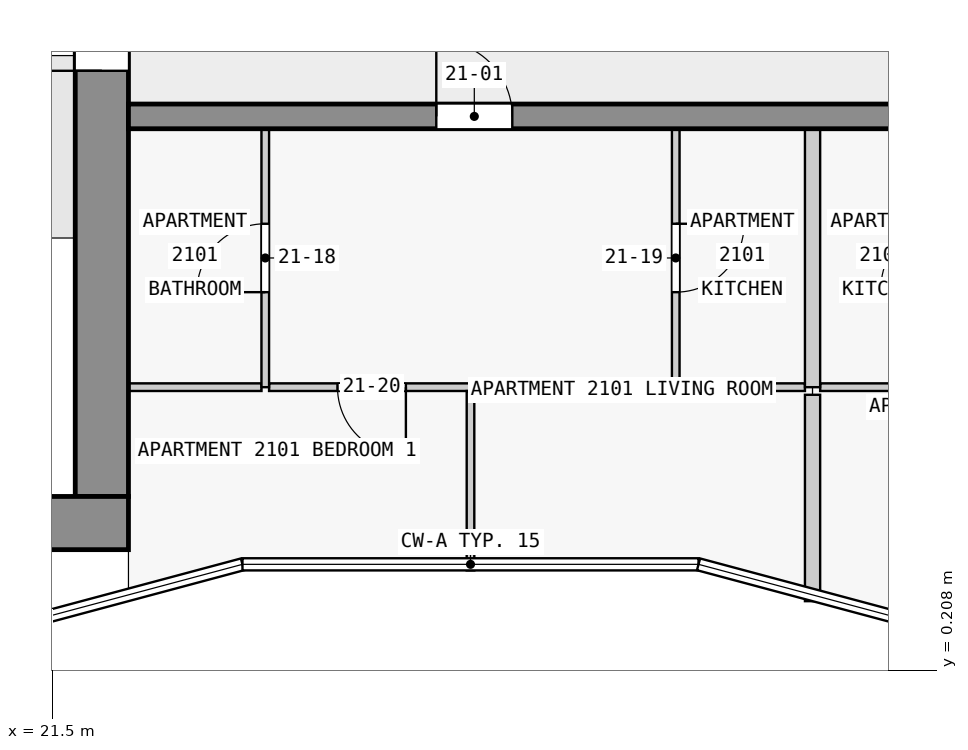
"""IFC4 building model, lengths in metres.
Left out: names, types, materials, properties, quantities, classifications, styles, units other than length and angle.
Written with IfcOpenShell. Run it as: python <this file> out.ifc"""

import sys

from ifc_helpers import new_model, si_unit, direction, frame, frame_2d, origin, place, context, subcontext, project, spatial, rectangle, extrude, element, fill, save


model = new_model("IFC4")
c1 = context("Model", 3, precision=1e-05, world=origin(), true_north=direction((0.0, 1.0)))
c2 = subcontext(c1, "Body", "Model", "MODEL_VIEW")
j1 = project(units=[si_unit("LENGTHUNIT", "METRE"), si_unit("PLANEANGLEUNIT", "RADIAN")], contexts=[c1])
p1 = place(None, origin())
s1 = spatial("IfcSite", under=j1, at=p1, CompositionType="ELEMENT")
p2 = place(p1, origin())
s2 = spatial("IfcBuilding", under=s1, at=p2, CompositionType="ELEMENT")
p3 = place(p2, frame((0.0, 0.0, 85.3)))
s3 = spatial("IfcBuildingStorey", under=s2, at=p3, CompositionType="ELEMENT", Elevation=85.3)
p4 = place(p3, frame((1.6, 2.15, 0.0), z_axis=(0.0, 0.0, 1.0), x_axis=(1.0, 0.0, 0.0)))
e1 = element("IfcWall", 1, at=p4, inside=s3, PredefinedType="SHEAR", context=c2, shape_type="SweptSolid", body=[
    extrude(rectangle(XDim=20.9, YDim=0.7, at=frame_2d((10.45, 0.0))), origin(), (0.0, 0.0, 1.0), 3.25),
])
p5 = place(p3, frame((22.15, 2.5, 0.0), z_axis=(0.0, 0.0, 1.0), x_axis=(0.0, 1.0, 0.0)))
e2 = element("IfcWall", 2, at=p5, inside=s3, PredefinedType="SHEAR", context=c2, shape_type="SweptSolid", body=[
    extrude(rectangle(XDim=14.8, YDim=0.7, at=frame_2d((7.4, 0.0))), origin(), (0.0, 0.0, 1.0), 3.25),
])
p6 = place(p5, frame((5.6, 0.0, 0.0)))
e3 = element("IfcOpeningElement", 3, at=p6, cuts=e2, PredefinedType="OPENING", context=c2, shape_type="SweptSolid", body=[
    extrude(rectangle(XDim=1.8, YDim=2.1, at=frame_2d((0.9, 1.05))), frame((0.0, 0.36, 0.0), z_axis=(0.0, -1.0, 0.0), x_axis=(1.0, 0.0, 0.0)), (0.0, 0.0, 1.0), 0.72),
])
p7 = place(p3, frame((22.5, 7.5, 0.0), z_axis=(0.0, 0.0, 1.0), x_axis=(1.0, 0.0, 0.0)))
e4 = element("IfcWall", 4, at=p7, inside=s3, PredefinedType="SHEAR", context=c2, shape_type="SweptSolid", body=[
    extrude(rectangle(XDim=22.5, YDim=0.325, at=frame_2d((11.25, 0.0))), origin(), (0.0, 0.0, 1.0), 3.25),
])
p8 = place(p7, frame((4.05, 0.0, 0.0)))
e5 = element("IfcOpeningElement", 5, at=p8, cuts=e4, PredefinedType="OPENING", context=c2, shape_type="SweptSolid", body=[
    extrude(rectangle(XDim=1.0, YDim=2.1, at=frame_2d((0.5, 1.05))), frame((0.0, 0.172, 0.0), z_axis=(0.0, -1.0, 0.0), x_axis=(1.0, 0.0, 0.0)), (0.0, 0.0, 1.0), 0.345),
])
p9 = place(p7, frame((13.05, 0.0, 0.0)))
e6 = element("IfcOpeningElement", 6, at=p9, cuts=e4, PredefinedType="OPENING", context=c2, shape_type="SweptSolid", body=[
    extrude(rectangle(XDim=1.0, YDim=2.1, at=frame_2d((0.5, 1.05))), frame((0.0, 0.172, 0.0), z_axis=(0.0, -1.0, 0.0), x_axis=(1.0, 0.0, 0.0)), (0.0, 0.0, 1.0), 0.345),
])
p10 = place(p7, frame((18.75, 0.0, 0.0)))
e7 = element("IfcOpeningElement", 7, at=p10, cuts=e4, PredefinedType="OPENING", context=c2, shape_type="SweptSolid", body=[
    extrude(rectangle(XDim=0.9, YDim=2.1, at=frame_2d((0.45, 1.05))), frame((0.0, 0.172, 0.0), z_axis=(0.0, -1.0, 0.0), x_axis=(1.0, 0.0, 0.0)), (0.0, 0.0, 1.0), 0.345),
])
p11 = place(p7, frame((20.95, 0.0, 0.0)))
e8 = element("IfcOpeningElement", 8, at=p11, cuts=e4, PredefinedType="OPENING", context=c2, shape_type="SweptSolid", body=[
    extrude(rectangle(XDim=1.0, YDim=2.1, at=frame_2d((0.5, 1.05))), frame((0.0, 0.172, 0.0), z_axis=(0.0, -1.0, 0.0), x_axis=(1.0, 0.0, 0.0)), (0.0, 0.0, 1.0), 0.345),
])
p12 = place(p3, frame((27.0, 3.938, 0.0), z_axis=(0.0, 0.0, 1.0), x_axis=(-1.0, 0.0, 0.0)))
e9 = element("IfcWall", 9, at=p12, inside=s3, PredefinedType="PARTITIONING", context=c2, shape_type="SweptSolid", body=[
    extrude(rectangle(XDim=2.65, YDim=0.1, at=frame_2d((1.325, 0.0))), origin(), (0.0, 0.0, 1.0), 3.25),
])
p13 = place(p12, frame((0.85, 0.0, 0.0)))
e10 = element("IfcOpeningElement", 10, at=p13, cuts=e9, PredefinedType="OPENING", context=c2, shape_type="SweptSolid", body=[
    extrude(rectangle(XDim=0.9, YDim=2.1, at=frame_2d((0.45, 1.05))), frame((0.0, 0.06, 0.0), z_axis=(0.0, -1.0, 0.0), x_axis=(1.0, 0.0, 0.0)), (0.0, 0.0, 1.0), 0.12),
])
p14 = place(p3, frame((22.5, 3.938, 0.0), z_axis=(0.0, 0.0, 1.0), x_axis=(1.0, 0.0, 0.0)))
e11 = element("IfcWall", 11, at=p14, inside=s3, PredefinedType="PARTITIONING", context=c2, shape_type="SweptSolid", body=[
    extrude(rectangle(XDim=1.75, YDim=0.1, at=frame_2d((0.875, 0.0))), origin(), (0.0, 0.0, 1.0), 3.25),
])
for number, where, z_axis, x_axis in (
    (12, (29.7, 3.938, 0.0), (0.0, 0.0, 1.0), (1.0, 0.0, 0.0)),
    (13, (31.6, 3.938, 0.0), (0.0, 0.0, 1.0), (1.0, 0.0, 0.0)),
):
    element("IfcWall", number, at=place(p3, frame(where, z_axis=z_axis, x_axis=x_axis)), inside=s3, PredefinedType="PARTITIONING", context=c2, shape_type="SweptSolid", body=[
        extrude(rectangle(XDim=1.7, YDim=0.1, at=frame_2d((0.85, 0.0))), origin(), (0.0, 0.0, 1.0), 3.25),
    ])
p15 = place(p3, frame((24.3, 3.938, 0.0), z_axis=(0.0, 0.0, 1.0), x_axis=(0.0, 1.0, 0.0)))
e14 = element("IfcWall", 14, at=p15, inside=s3, PredefinedType="PARTITIONING", context=c2, shape_type="SweptSolid", body=[
    extrude(rectangle(XDim=3.4, YDim=0.1, at=frame_2d((1.7, 0.0))), origin(), (0.0, 0.0, 1.0), 3.25),
])
p16 = place(p15, frame((1.25, 0.0, 0.0)))
e15 = element("IfcOpeningElement", 15, at=p16, cuts=e14, PredefinedType="OPENING", context=c2, shape_type="SweptSolid", body=[
    extrude(rectangle(XDim=0.9, YDim=2.1, at=frame_2d((0.45, 1.05))), frame((0.0, 0.06, 0.0), z_axis=(0.0, -1.0, 0.0), x_axis=(1.0, 0.0, 0.0)), (0.0, 0.0, 1.0), 0.12),
])
p17 = place(p3, frame((27.0, 1.527, 0.0), z_axis=(0.0, 0.0, 1.0), x_axis=(0.0, 1.0, 0.0)))
e16 = element("IfcWall", 16, at=p17, inside=s3, PredefinedType="PARTITIONING", context=c2, shape_type="SweptSolid", body=[
    extrude(rectangle(XDim=2.361, YDim=0.1, at=frame_2d((1.18, 0.0))), origin(), (0.0, 0.0, 1.0), 3.25),
])
p18 = place(p3, frame((29.7, 7.337, 0.0), z_axis=(0.0, 0.0, 1.0), x_axis=(0.0, -1.0, 0.0)))
e17 = element("IfcWall", 17, at=p18, inside=s3, PredefinedType="PARTITIONING", context=c2, shape_type="SweptSolid", body=[
    extrude(rectangle(XDim=3.35, YDim=0.1, at=frame_2d((1.675, 0.0))), origin(), (0.0, 0.0, 1.0), 3.25),
])
p19 = place(p18, frame((1.25, 0.0, 0.0)))
e18 = element("IfcOpeningElement", 18, at=p19, cuts=e17, PredefinedType="OPENING", context=c2, shape_type="SweptSolid", body=[
    extrude(rectangle(XDim=0.9, YDim=2.1, at=frame_2d((0.45, 1.05))), frame((0.0, 0.06, 0.0), z_axis=(0.0, -1.0, 0.0), x_axis=(1.0, 0.0, 0.0)), (0.0, 0.0, 1.0), 0.12),
])
p20 = place(p3, frame((31.5, 3.837, 0.0), z_axis=(0.0, 0.0, 1.0), x_axis=(0.0, -1.0, 0.0)))
e19 = element("IfcWall", 19, at=p20, inside=s3, PredefinedType="PARTITIONING", context=c2, shape_type="SweptSolid", body=[
    extrude(rectangle(XDim=2.715, YDim=0.2, at=frame_2d((1.357, 0.0))), origin(), (0.0, 0.0, 1.0), 3.25),
])
p21 = place(p3, frame((31.5, 3.938, 0.0), z_axis=(0.0, 0.0, 1.0), x_axis=(0.0, 1.0, 0.0)))
e20 = element("IfcWall", 20, at=p21, inside=s3, PredefinedType="PARTITIONING", context=c2, shape_type="SweptSolid", body=[
    extrude(rectangle(XDim=3.4, YDim=0.2, at=frame_2d((1.7, 0.0))), origin(), (0.0, 0.0, 1.0), 3.25),
])
p22 = place(p6, origin())
e21 = element("IfcDoor", 21, at=p22, inside=s3, OperationType="DOUBLE_DOOR_SINGLE_SWING", PredefinedType="DOOR", context=c2, shape_type="SweptSolid", body=[
    extrude(rectangle(XDim=1.8, YDim=2.1, at=frame_2d((0.9, 1.05))), frame((0.0, 0.025, 0.0), z_axis=(0.0, -1.0, 0.0), x_axis=(1.0, 0.0, 0.0)), (0.0, 0.0, 1.0), 0.05),
])
fill(e3, e21)
p23 = place(p8, origin())
e22 = element("IfcDoor", 22, at=p23, inside=s3, OperationType="SINGLE_SWING_LEFT", PredefinedType="DOOR", context=c2, shape_type="SweptSolid", body=[
    extrude(rectangle(XDim=1.0, YDim=2.1, at=frame_2d((0.5, 1.05))), frame((0.0, 0.025, 0.0), z_axis=(0.0, -1.0, 0.0), x_axis=(1.0, 0.0, 0.0)), (0.0, 0.0, 1.0), 0.05),
])
fill(e5, e22)
p24 = place(p16, origin())
e23 = element("IfcDoor", 23, at=p24, inside=s3, OperationType="SINGLE_SWING_LEFT", PredefinedType="DOOR", context=c2, shape_type="SweptSolid", body=[
    extrude(rectangle(XDim=0.9, YDim=2.1, at=frame_2d((0.45, 1.05))), frame((0.0, 0.025, 0.0), z_axis=(0.0, -1.0, 0.0), x_axis=(1.0, 0.0, 0.0)), (0.0, 0.0, 1.0), 0.05),
])
fill(e15, e23)
p25 = place(p19, origin())
e24 = element("IfcDoor", 24, at=p25, inside=s3, OperationType="SINGLE_SWING_RIGHT", PredefinedType="DOOR", context=c2, shape_type="SweptSolid", body=[
    extrude(rectangle(XDim=0.9, YDim=2.1, at=frame_2d((0.45, 1.05))), frame((0.0, 0.025, 0.0), z_axis=(0.0, -1.0, 0.0), x_axis=(1.0, 0.0, 0.0)), (0.0, 0.0, 1.0), 0.05),
])
fill(e18, e24)
p26 = place(p13, origin())
e25 = element("IfcDoor", 25, at=p26, inside=s3, OperationType="SINGLE_SWING_LEFT", PredefinedType="DOOR", context=c2, shape_type="SweptSolid", body=[
    extrude(rectangle(XDim=0.9, YDim=2.1, at=frame_2d((0.45, 1.05))), frame((0.0, 0.025, 0.0), z_axis=(0.0, -1.0, 0.0), x_axis=(1.0, 0.0, 0.0)), (0.0, 0.0, 1.0), 0.05),
])
fill(e10, e25)
save(model, sys.argv[1])
